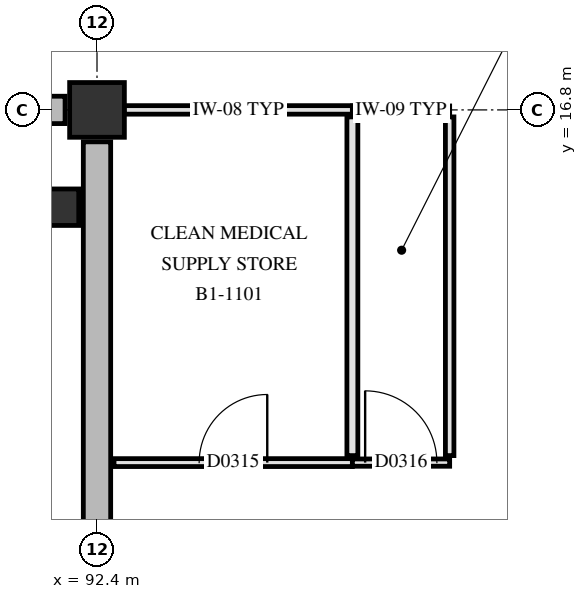
"""IFC4 building model, lengths in metres.
Left out: names, types, materials, properties, quantities, classifications, styles, units other than length and angle.
Written with IfcOpenShell. Run it as: python <this file> out.ifc"""

import sys

from ifc_helpers import new_model, si_unit, direction, frame, frame_2d, origin, origin_2d, place, context, subcontext, project, spatial, rectangle, extrude, element, fill, save


model = new_model("IFC4")
c1 = context("Model", 3, precision=1e-05, world=origin(), true_north=direction((0.0, 1.0)))
c2 = subcontext(c1, "Body", "Model", "MODEL_VIEW")
j1 = project(units=[si_unit("LENGTHUNIT", "METRE"), si_unit("PLANEANGLEUNIT", "RADIAN")], contexts=[c1])
p1 = place(None, origin())
s1 = spatial("IfcSite", under=j1, at=p1, CompositionType="ELEMENT")
p2 = place(p1, origin())
s2 = spatial("IfcBuilding", under=s1, at=p2, CompositionType="ELEMENT")
p3 = place(p2, frame((0.0, 0.0, -5.4)))
s3 = spatial("IfcBuildingStorey", under=s2, at=p3, CompositionType="ELEMENT", Elevation=-5.4)
p4 = place(p3, frame((92.4, 16.8, 0.0), z_axis=(0.0, 0.0, 1.0), x_axis=(1.0, 0.0, 0.0)))
e1 = element("IfcColumn", 1, at=p4, inside=s3, PredefinedType="COLUMN", context=c2, shape_type="SweptSolid", body=[
    extrude(rectangle(XDim=0.9, YDim=0.9, at=origin_2d()), origin(), (0.0, 0.0, 1.0), 5.4),
])
p5 = place(p3, frame((92.4, 8.925, 0.0), z_axis=(0.0, 0.0, 1.0), x_axis=(0.0, 1.0, 0.0)))
e2 = element("IfcWall", 2, at=p5, inside=s3, PredefinedType="SOLIDWALL", context=c2, shape_type="SweptSolid", body=[
    extrude(rectangle(XDim=7.35, YDim=0.45, at=frame_2d((3.675, 0.0))), origin(), (0.0, 0.0, 1.0), 5.08),
])
p6 = place(p3, frame((91.875, 16.8, 0.0), z_axis=(0.0, 0.0, 1.0), x_axis=(-1.0, 0.0, 0.0)))
e3 = element("IfcWall", 3, at=p6, inside=s3, PredefinedType="SOLIDWALL", context=c2, shape_type="SweptSolid", body=[
    extrude(rectangle(XDim=7.4, YDim=0.45, at=frame_2d((3.7, 0.0))), origin(), (0.0, 0.0, 1.0), 5.08),
])
p7 = place(p3, frame((91.8, 15.2, 0.0), z_axis=(0.0, 0.0, 1.0), x_axis=(1.0, 0.0, 0.0)))
e4 = element("IfcColumn", 4, at=p7, inside=s3, PredefinedType="COLUMN", context=c2, shape_type="SweptSolid", body=[
    extrude(rectangle(XDim=0.6, YDim=0.6, at=origin_2d()), origin(), (0.0, 0.0, 1.0), 4.0),
])
p8 = place(p3, frame((92.68, 11.0, 0.0), z_axis=(0.0, 0.0, 1.0), x_axis=(1.0, 0.0, 0.0)))
e5 = element("IfcWall", 5, at=p8, inside=s3, PredefinedType="PARTITIONING", context=c2, shape_type="SweptSolid", body=[
    extrude(rectangle(XDim=3.92, YDim=0.13, at=frame_2d((1.96, 0.0))), origin(), (0.0, 0.0, 1.0), 5.07),
])
p9 = place(p8, frame((1.4, 0.0, 0.0)))
e6 = element("IfcOpeningElement", 6, at=p9, cuts=e5, PredefinedType="OPENING", context=c2, shape_type="SweptSolid", body=[
    extrude(rectangle(XDim=1.12, YDim=2.18, at=frame_2d((0.56, 1.09))), frame((0.0, 0.075, 0.0), z_axis=(0.0, -1.0, 0.0), x_axis=(1.0, 0.0, 0.0)), (0.0, 0.0, 1.0), 0.15),
])
p10 = place(p3, frame((96.6, 11.0, 0.0), z_axis=(0.0, 0.0, 1.0), x_axis=(1.0, 0.0, 0.0)))
e7 = element("IfcWall", 7, at=p10, inside=s3, PredefinedType="PARTITIONING", context=c2, shape_type="SweptSolid", body=[
    extrude(rectangle(XDim=1.6, YDim=0.12, at=frame_2d((0.8, 0.0))), origin(), (0.0, 0.0, 1.0), 5.07),
])
p11 = place(p10, frame((0.21, 0.0, 0.0)))
e8 = element("IfcOpeningElement", 8, at=p11, cuts=e7, PredefinedType="OPENING", context=c2, shape_type="SweptSolid", body=[
    extrude(rectangle(XDim=1.18, YDim=2.18, at=frame_2d((0.59, 1.09))), frame((0.0, 0.07, 0.0), z_axis=(0.0, -1.0, 0.0), x_axis=(1.0, 0.0, 0.0)), (0.0, 0.0, 1.0), 0.14),
])
p12 = place(p3, frame((92.845, 16.8, 0.0), z_axis=(0.0, 0.0, 1.0), x_axis=(1.0, 0.0, 0.0)))
e9 = element("IfcWall", 9, at=p12, inside=s3, PredefinedType="PARTITIONING", context=c2, shape_type="SweptSolid", body=[
    extrude(rectangle(XDim=3.755, YDim=0.14, at=frame_2d((1.877, 0.0))), origin(), (0.0, 0.0, 1.0), 4.42),
])
p13 = place(p3, frame((96.6, 16.8, 0.0), z_axis=(0.0, 0.0, 1.0), x_axis=(1.0, 0.0, 0.0)))
e10 = element("IfcWall", 10, at=p13, inside=s3, PredefinedType="PARTITIONING", context=c2, shape_type="SweptSolid", body=[
    extrude(rectangle(XDim=1.6, YDim=0.13, at=frame_2d((0.8, 0.0))), origin(), (0.0, 0.0, 1.0), 4.42),
])
p14 = place(p3, frame((96.6, 11.115, 0.0), z_axis=(0.0, 0.0, 1.0), x_axis=(0.0, 1.0, 0.0)))
e11 = element("IfcWall", 11, at=p14, inside=s3, PredefinedType="PARTITIONING", context=c2, shape_type="SweptSolid", body=[
    extrude(rectangle(XDim=5.57, YDim=0.18, at=frame_2d((2.785, 0.0))), origin(), (0.0, 0.0, 1.0), 4.42),
])
p15 = place(p3, frame((98.2, 11.115, 0.0), z_axis=(0.0, 0.0, 1.0), x_axis=(0.0, 1.0, 0.0)))
e12 = element("IfcWall", 12, at=p15, inside=s3, PredefinedType="PARTITIONING", context=c2, shape_type="SweptSolid", body=[
    extrude(rectangle(XDim=5.57, YDim=0.14, at=frame_2d((2.785, 0.0))), origin(), (0.0, 0.0, 1.0), 4.42),
])
p16 = place(p9, origin())
e13 = element("IfcDoor", 13, at=p16, inside=s3, OperationType="SINGLE_SWING_RIGHT", PredefinedType="DOOR", context=c2, shape_type="SweptSolid", body=[
    extrude(rectangle(XDim=1.12, YDim=2.18, at=frame_2d((0.56, 1.09))), frame((0.0, 0.025, 0.0), z_axis=(0.0, -1.0, 0.0), x_axis=(1.0, 0.0, 0.0)), (0.0, 0.0, 1.0), 0.05),
])
fill(e6, e13)
p17 = place(p11, origin())
e14 = element("IfcDoor", 14, at=p17, inside=s3, OperationType="SINGLE_SWING_LEFT", PredefinedType="DOOR", context=c2, shape_type="SweptSolid", body=[
    extrude(rectangle(XDim=1.18, YDim=2.18, at=frame_2d((0.59, 1.09))), frame((0.0, 0.025, 0.0), z_axis=(0.0, -1.0, 0.0), x_axis=(1.0, 0.0, 0.0)), (0.0, 0.0, 1.0), 0.05),
])
fill(e8, e14)
save(model, sys.argv[1])
